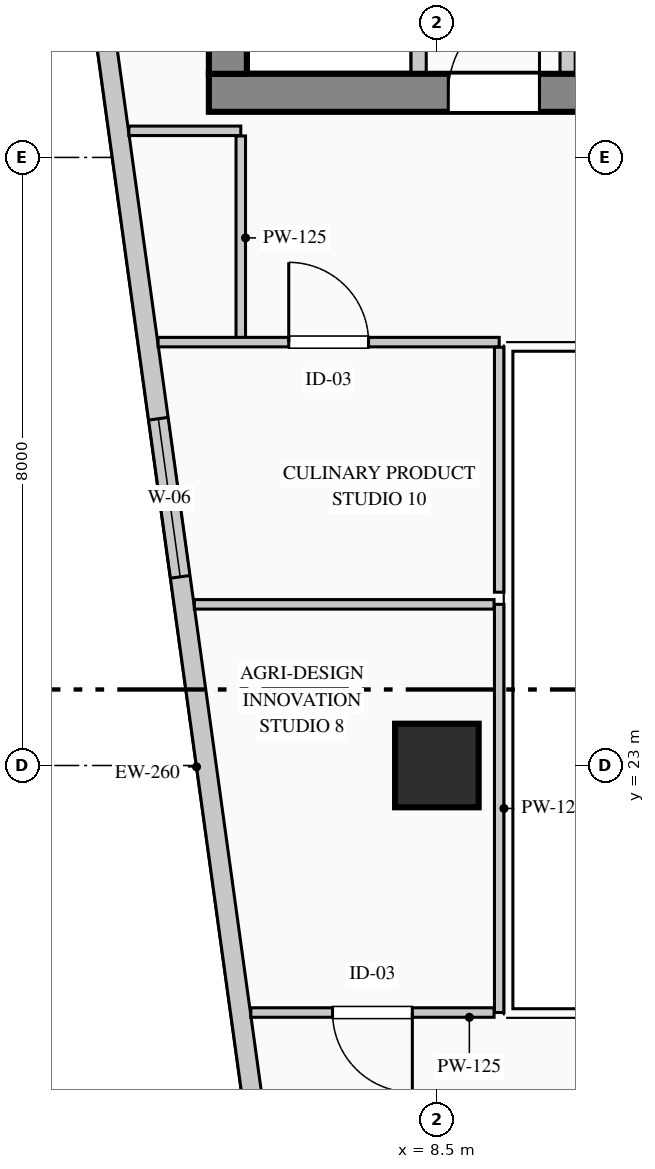
"""IFC4 building model, lengths in metres.
Left out: names, types, materials, properties, quantities, classifications, styles, units other than length and angle.
Written with IfcOpenShell. Run it as: python <this file> out.ifc"""

import sys

from ifc_helpers import new_model, si_unit, direction, frame, frame_2d, origin, origin_2d, place, context, subcontext, project, spatial, rectangle, extrude, element, fill, save


model = new_model("IFC4")
c1 = context("Model", 3, precision=1e-05, world=origin(), true_north=direction((0.0, 1.0)))
c2 = subcontext(c1, "Body", "Model", "MODEL_VIEW")
j1 = project(units=[si_unit("LENGTHUNIT", "METRE"), si_unit("PLANEANGLEUNIT", "RADIAN")], contexts=[c1])
p1 = place(None, origin())
s1 = spatial("IfcSite", under=j1, at=p1, CompositionType="ELEMENT")
p2 = place(p1, origin())
s2 = spatial("IfcBuilding", under=s1, at=p2, CompositionType="ELEMENT")
p3 = place(p2, frame((0.0, 0.0, 174.6)))
s3 = spatial("IfcBuildingStorey", under=s2, at=p3, CompositionType="ELEMENT", Elevation=174.6)
p4 = place(p3, frame((5.5, 31.85, 0.0), z_axis=(0.0, 0.0, 1.0), x_axis=(1.0, 0.0, 0.0)))
e1 = element("IfcWall", 1, at=p4, inside=s3, PredefinedType="SHEAR", context=c2, shape_type="SweptSolid", body=[
    extrude(rectangle(XDim=17.85, YDim=0.5, at=frame_2d((8.925, 0.0))), origin(), (0.0, 0.0, 1.0), 3.95),
])
p5 = place(p4, frame((3.15, 0.0, 0.0)))
e2 = element("IfcOpeningElement", 2, at=p5, cuts=e1, PredefinedType="OPENING", context=c2, shape_type="SweptSolid", body=[
    extrude(rectangle(XDim=1.2, YDim=2.2, at=frame_2d((0.6, 1.1))), frame((0.0, 0.26, 0.0), z_axis=(0.0, -1.0, 0.0), x_axis=(1.0, 0.0, 0.0)), (0.0, 0.0, 1.0), 0.52),
])
p6 = place(p4, frame((7.0, 0.0, 0.0)))
e3 = element("IfcOpeningElement", 3, at=p6, cuts=e1, PredefinedType="OPENING", context=c2, shape_type="SweptSolid", body=[
    extrude(rectangle(XDim=1.2, YDim=2.2, at=frame_2d((0.6, 1.1))), frame((0.0, 0.26, 0.0), z_axis=(0.0, -1.0, 0.0), x_axis=(1.0, 0.0, 0.0)), (0.0, 0.0, 1.0), 0.52),
])
p7 = place(p4, frame((8.85, 0.0, 0.0)))
e4 = element("IfcOpeningElement", 4, at=p7, cuts=e1, PredefinedType="OPENING", context=c2, shape_type="SweptSolid", body=[
    extrude(rectangle(XDim=1.15, YDim=2.2, at=frame_2d((0.575, 1.1))), frame((0.0, 0.26, 0.0), z_axis=(0.0, -1.0, 0.0), x_axis=(1.0, 0.0, 0.0)), (0.0, 0.0, 1.0), 0.52),
])
p8 = place(p4, frame((15.95, 0.0, 0.0)))
e5 = element("IfcOpeningElement", 5, at=p8, cuts=e1, PredefinedType="OPENING", context=c2, shape_type="SweptSolid", body=[
    extrude(rectangle(XDim=1.2, YDim=2.2, at=frame_2d((0.6, 1.1))), frame((0.0, 0.26, 0.0), z_axis=(0.0, -1.0, 0.0), x_axis=(1.0, 0.0, 0.0)), (0.0, 0.0, 1.0), 0.52),
])
p9 = place(p3, frame((5.75, 32.1, 0.0), z_axis=(0.0, 0.0, 1.0), x_axis=(0.0, 1.0, 0.0)))
e6 = element("IfcWall", 6, at=p9, inside=s3, PredefinedType="SHEAR", context=c2, shape_type="SweptSolid", body=[
    extrude(rectangle(XDim=8.3, YDim=0.5, at=frame_2d((4.15, 0.0))), origin(), (0.0, 0.0, 1.0), 3.95),
])
p10 = place(p3, frame((8.5, 23.0, 0.0), z_axis=(0.0, 0.0, 1.0), x_axis=(1.0, 0.0, 0.0)))
e7 = element("IfcColumn", 7, at=p10, inside=s3, PredefinedType="COLUMN", context=c2, shape_type="SweptSolid", body=[
    extrude(rectangle(XDim=1.1, YDim=1.1, at=origin_2d()), origin(), (0.0, 0.0, 1.0), 3.95),
])
p11 = place(p3, frame((7.993, 4.73, 0.0), z_axis=(0.0, 0.0, 1.0), x_axis=(-0.136989009016, 0.990572567462, 0.0)))
e8 = element("IfcWall", 8, at=p11, inside=s3, PredefinedType="STANDARD", context=c2, shape_type="SweptSolid", body=[
    extrude(rectangle(XDim=36.888, YDim=0.26, at=frame_2d((18.444, 0.0))), origin(), (0.0, 0.0, 1.0), 3.6),
])
p12 = place(p11, frame((20.949, 0.0, 0.9)))
e9 = element("IfcOpeningElement", 9, at=p12, cuts=e8, PredefinedType="OPENING", context=c2, shape_type="SweptSolid", body=[
    extrude(rectangle(XDim=2.1, YDim=2.0, at=frame_2d((1.05, 1.0))), frame((0.0, 0.14, 0.0), z_axis=(0.0, -1.0, 0.0), x_axis=(1.0, 0.0, 0.0)), (0.0, 0.0, 1.0), 0.28),
])
p13 = place(p3, frame((8.26, 32.12, 0.0), z_axis=(0.0, 0.0, 1.0), x_axis=(0.0, 1.0, 0.0)))
e10 = element("IfcWall", 10, at=p13, inside=s3, PredefinedType="PARTITIONING", context=c2, shape_type="SweptSolid", body=[
    extrude(rectangle(XDim=7.5, YDim=0.2, at=frame_2d((3.75, 0.0))), origin(), (0.0, 0.0, 1.0), 3.6),
])
p14 = place(p3, frame((10.22, 32.12, 0.0), z_axis=(0.0, 0.0, 1.0), x_axis=(0.0, 1.0, 0.0)))
e11 = element("IfcWall", 11, at=p14, inside=s3, PredefinedType="PARTITIONING", context=c2, shape_type="SweptSolid", body=[
    extrude(rectangle(XDim=8.26, YDim=0.2, at=frame_2d((4.13, 0.0))), origin(), (0.0, 0.0, 1.0), 3.6),
])
p15 = place(p3, frame((9.32, 25.12, 0.0), z_axis=(0.0, 0.0, 1.0), x_axis=(0.0, -1.0, 0.0)))
e12 = element("IfcWall", 12, at=p15, inside=s3, PredefinedType="PARTITIONING", context=c2, shape_type="SweptSolid", body=[
    extrude(rectangle(XDim=5.37, YDim=0.125, at=frame_2d((2.685, 0.0))), origin(), (0.0, 0.0, 1.0), 3.385),
])
p16 = place(p3, frame((9.252, 19.75, 0.0), z_axis=(0.0, 0.0, 1.0), x_axis=(-1.0, 0.0, 0.0)))
e13 = element("IfcWall", 13, at=p16, inside=s3, PredefinedType="PARTITIONING", context=c2, shape_type="SweptSolid", body=[
    extrude(rectangle(XDim=3.2, YDim=0.125, at=frame_2d((1.6, 0.0))), origin(), (0.0, 0.0, 1.0), 3.6),
])
p17 = place(p16, frame((1.075, 0.0, 0.0)))
e14 = element("IfcOpeningElement", 14, at=p17, cuts=e13, PredefinedType="OPENING", context=c2, shape_type="SweptSolid", body=[
    extrude(rectangle(XDim=1.05, YDim=2.15, at=frame_2d((0.525, 1.075))), frame((0.0, 0.073, 0.0), z_axis=(0.0, -1.0, 0.0), x_axis=(1.0, 0.0, 0.0)), (0.0, 0.0, 1.0), 0.145),
])
p18 = place(p3, frame((5.309, 25.12, 0.0), z_axis=(0.0, 0.0, 1.0), x_axis=(1.0, 0.0, 0.0)))
e15 = element("IfcWall", 15, at=p18, inside=s3, PredefinedType="PARTITIONING", context=c2, shape_type="SweptSolid", body=[
    extrude(rectangle(XDim=3.943, YDim=0.125, at=frame_2d((1.972, 0.0))), origin(), (0.0, 0.0, 1.0), 3.6),
])
p19 = place(p3, frame((4.448, 31.35, 0.0), z_axis=(0.0, 0.0, 1.0), x_axis=(1.0, 0.0, 0.0)))
e16 = element("IfcWall", 16, at=p19, inside=s3, PredefinedType="PARTITIONING", context=c2, shape_type="SweptSolid", body=[
    extrude(rectangle(XDim=1.472, YDim=0.125, at=frame_2d((0.736, 0.0))), origin(), (0.0, 0.0, 1.0), 3.6),
])
p20 = place(p3, frame((5.92, 31.282, 0.0), z_axis=(0.0, 0.0, 1.0), x_axis=(0.0, -1.0, 0.0)))
e17 = element("IfcWall", 17, at=p20, inside=s3, PredefinedType="PARTITIONING", context=c2, shape_type="SweptSolid", body=[
    extrude(rectangle(XDim=2.682, YDim=0.125, at=frame_2d((1.341, 0.0))), origin(), (0.0, 0.0, 1.0), 3.6),
])
p21 = place(p3, frame((4.832, 28.57, 0.0), z_axis=(0.0, 0.0, 1.0), x_axis=(1.0, 0.0, 0.0)))
e18 = element("IfcWall", 18, at=p21, inside=s3, PredefinedType="PARTITIONING", context=c2, shape_type="SweptSolid", body=[
    extrude(rectangle(XDim=4.488, YDim=0.125, at=frame_2d((2.244, 0.0))), origin(), (0.0, 0.0, 1.0), 3.6),
])
p22 = place(p21, frame((1.719, 0.0, 0.0)))
e19 = element("IfcOpeningElement", 19, at=p22, cuts=e18, PredefinedType="OPENING", context=c2, shape_type="SweptSolid", body=[
    extrude(rectangle(XDim=1.05, YDim=2.15, at=frame_2d((0.525, 1.075))), frame((0.0, 0.073, 0.0), z_axis=(0.0, -1.0, 0.0), x_axis=(1.0, 0.0, 0.0)), (0.0, 0.0, 1.0), 0.145),
])
p23 = place(p3, frame((9.32, 28.502, 0.0), z_axis=(0.0, 0.0, 1.0), x_axis=(0.0, -1.0, 0.0)))
e20 = element("IfcWall", 20, at=p23, inside=s3, PredefinedType="PARTITIONING", context=c2, shape_type="SweptSolid", body=[
    extrude(rectangle(XDim=3.222, YDim=0.125, at=frame_2d((1.611, 0.0))), origin(), (0.0, 0.0, 1.0), 3.385),
])
p24 = place(p12, origin())
e21 = element("IfcWindow", 21, at=p24, inside=s3, PartitioningType="DOUBLE_PANEL_VERTICAL", PredefinedType="WINDOW", context=c2, shape_type="SweptSolid", body=[
    extrude(rectangle(XDim=2.1, YDim=2.0, at=frame_2d((1.05, 1.0))), frame((0.0, 0.03, 0.0), z_axis=(0.0, -1.0, 0.0), x_axis=(1.0, 0.0, 0.0)), (0.0, 0.0, 1.0), 0.06),
])
fill(e9, e21)
p25 = place(p5, origin())
e22 = element("IfcDoor", 22, at=p25, inside=s3, OperationType="SINGLE_SWING_RIGHT", PredefinedType="DOOR", context=c2, shape_type="SweptSolid", body=[
    extrude(rectangle(XDim=1.2, YDim=2.2, at=frame_2d((0.6, 1.1))), frame((0.0, 0.025, 0.0), z_axis=(0.0, -1.0, 0.0), x_axis=(1.0, 0.0, 0.0)), (0.0, 0.0, 1.0), 0.05),
])
fill(e2, e22)
p26 = place(p17, origin())
e23 = element("IfcDoor", 23, at=p26, inside=s3, OperationType="SINGLE_SWING_LEFT", PredefinedType="DOOR", context=c2, shape_type="SweptSolid", body=[
    extrude(rectangle(XDim=1.05, YDim=2.15, at=frame_2d((0.525, 1.075))), frame((0.0, 0.025, 0.0), z_axis=(0.0, -1.0, 0.0), x_axis=(1.0, 0.0, 0.0)), (0.0, 0.0, 1.0), 0.05),
])
fill(e14, e23)
p27 = place(p22, origin())
e24 = element("IfcDoor", 24, at=p27, inside=s3, OperationType="SINGLE_SWING_LEFT", PredefinedType="DOOR", context=c2, shape_type="SweptSolid", body=[
    extrude(rectangle(XDim=1.05, YDim=2.15, at=frame_2d((0.525, 1.075))), frame((0.0, 0.025, 0.0), z_axis=(0.0, -1.0, 0.0), x_axis=(1.0, 0.0, 0.0)), (0.0, 0.0, 1.0), 0.05),
])
fill(e19, e24)
save(model, sys.argv[1])
